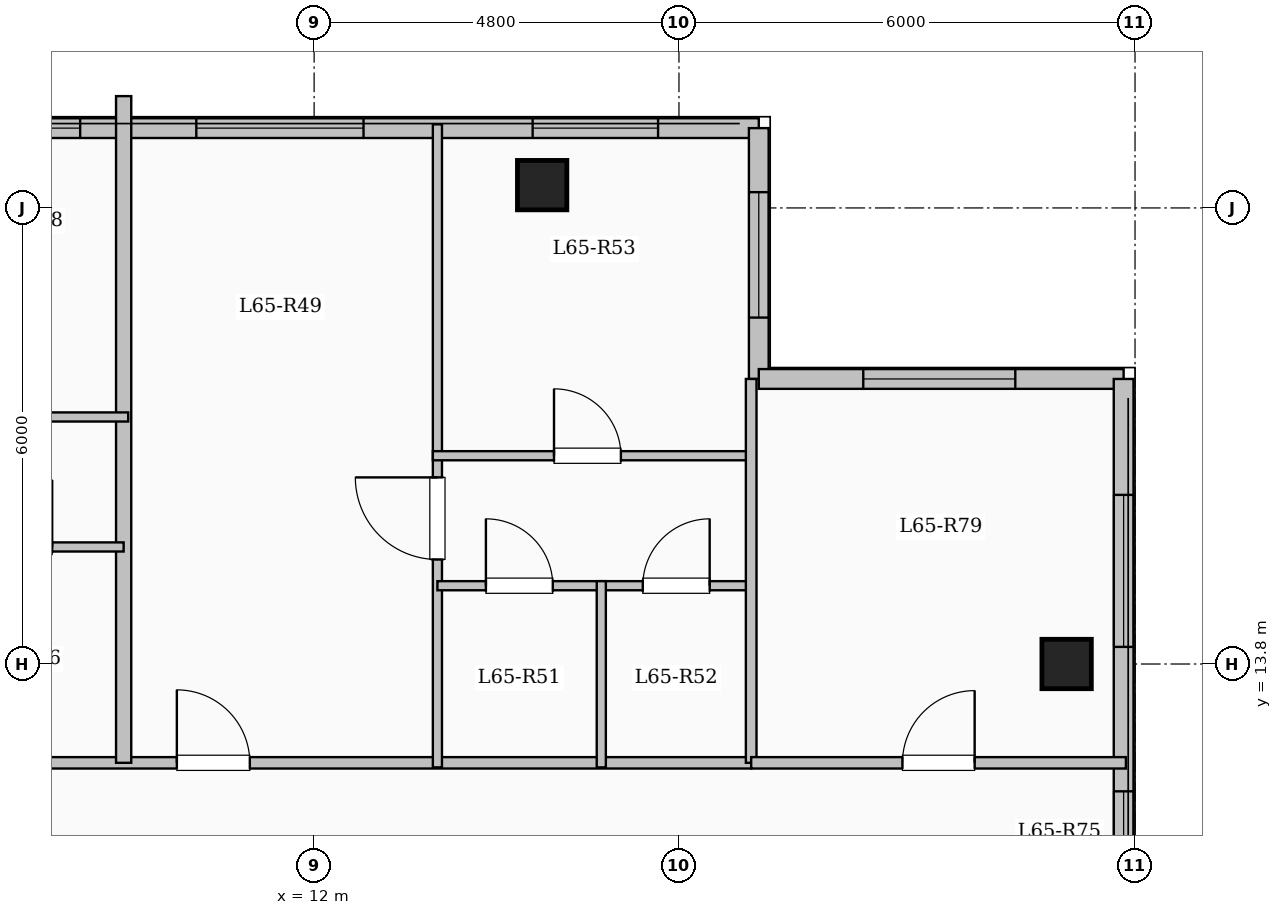
"""IFC4 building model, lengths in metres.
Left out: names, types, materials, properties, quantities, classifications, styles, units other than length and angle.
Written with IfcOpenShell. Run it as: python <this file> out.ifc"""

import sys

from ifc_helpers import new_model, si_unit, direction, frame, frame_2d, origin, origin_2d, place, context, subcontext, project, spatial, rectangle, extrude, element, fill, save


model = new_model("IFC4")
c1 = context("Model", 3, precision=1e-05, world=origin(), true_north=direction((0.0, 1.0)))
c2 = subcontext(c1, "Body", "Model", "MODEL_VIEW")
j1 = project(units=[si_unit("LENGTHUNIT", "METRE"), si_unit("PLANEANGLEUNIT", "RADIAN")], contexts=[c1])
p1 = place(None, origin())
s1 = spatial("IfcSite", under=j1, at=p1, CompositionType="ELEMENT")
p2 = place(p1, origin())
s2 = spatial("IfcBuilding", under=s1, at=p2, CompositionType="ELEMENT")
p3 = place(p2, frame((0.0, 0.0, 241.5)))
s3 = spatial("IfcBuildingStorey", under=s2, at=p3, CompositionType="ELEMENT", Elevation=241.5)
for number, where, z_axis, x_axis in (
    (1, (15.0, 20.1, 0.0), (0.0, 0.0, 1.0), (1.0, 0.0, 0.0)),
    (2, (21.9, 13.8, 0.0), (0.0, 0.0, 1.0), (1.0, 0.0, 0.0)),
):
    element("IfcColumn", number, at=place(p3, frame(where, z_axis=z_axis, x_axis=x_axis)), inside=s3, PredefinedType="COLUMN", context=c2, shape_type="SweptSolid", body=[
        extrude(rectangle(XDim=0.65, YDim=0.65, at=origin_2d()), origin(), (0.0, 0.0, 1.0), 3.35),
    ])
p4 = place(p3, frame((7.35, 20.85, 0.0), z_axis=(0.0, 0.0, 1.0), x_axis=(1.0, 0.0, 0.0)))
e3 = element("IfcWall", 3, at=p4, inside=s3, PredefinedType="SOLIDWALL", context=c2, shape_type="SweptSolid", body=[
    extrude(rectangle(XDim=10.5, YDim=0.26, at=frame_2d((5.25, 0.0))), origin(), (0.0, 0.0, 1.0), 3.1),
])
p5 = place(p4, frame((0.372, 0.0, 0.95)))
e4 = element("IfcOpeningElement", 4, at=p5, cuts=e3, PredefinedType="OPENING", context=c2, shape_type="SweptSolid", body=[
    extrude(rectangle(XDim=1.2, YDim=1.5, at=frame_2d((0.6, 0.75))), frame((0.0, 0.14, 0.0), z_axis=(0.0, -1.0, 0.0), x_axis=(1.0, 0.0, 0.0)), (0.0, 0.0, 1.0), 0.28),
])
p6 = place(p4, frame((3.1, 0.0, 0.9)))
e5 = element("IfcOpeningElement", 5, at=p6, cuts=e3, PredefinedType="OPENING", context=c2, shape_type="SweptSolid", body=[
    extrude(rectangle(XDim=2.2, YDim=1.75, at=frame_2d((1.1, 0.875))), frame((0.0, 0.14, 0.0), z_axis=(0.0, -1.0, 0.0), x_axis=(1.0, 0.0, 0.0)), (0.0, 0.0, 1.0), 0.28),
])
p7 = place(p4, frame((7.525, 0.0, 0.9)))
e6 = element("IfcOpeningElement", 6, at=p7, cuts=e3, PredefinedType="OPENING", context=c2, shape_type="SweptSolid", body=[
    extrude(rectangle(XDim=1.65, YDim=1.6, at=frame_2d((0.825, 0.8))), frame((0.0, 0.14, 0.0), z_axis=(0.0, -1.0, 0.0), x_axis=(1.0, 0.0, 0.0)), (0.0, 0.0, 1.0), 0.28),
])
p8 = place(p3, frame((17.85, 20.85, 0.0), z_axis=(0.0, 0.0, 1.0), x_axis=(0.0, -1.0, 0.0)))
e7 = element("IfcWall", 7, at=p8, inside=s3, PredefinedType="SOLIDWALL", context=c2, shape_type="SweptSolid", body=[
    extrude(rectangle(XDim=3.3, YDim=0.26, at=frame_2d((1.65, 0.0))), origin(), (0.0, 0.0, 1.0), 3.1),
])
p9 = place(p8, frame((0.843, 0.0, 0.9)))
e8 = element("IfcOpeningElement", 8, at=p9, cuts=e7, PredefinedType="OPENING", context=c2, shape_type="SweptSolid", body=[
    extrude(rectangle(XDim=1.65, YDim=1.6, at=frame_2d((0.825, 0.8))), frame((0.0, 0.14, 0.0), z_axis=(0.0, -1.0, 0.0), x_axis=(1.0, 0.0, 0.0)), (0.0, 0.0, 1.0), 0.28),
])
p10 = place(p3, frame((17.85, 17.55, 0.0), z_axis=(0.0, 0.0, 1.0), x_axis=(1.0, 0.0, 0.0)))
e9 = element("IfcWall", 9, at=p10, inside=s3, PredefinedType="SOLIDWALL", context=c2, shape_type="SweptSolid", body=[
    extrude(rectangle(XDim=4.8, YDim=0.26, at=frame_2d((2.4, 0.0))), origin(), (0.0, 0.0, 1.0), 3.1),
])
p11 = place(p10, frame((1.375, 0.0, 0.9)))
e10 = element("IfcOpeningElement", 10, at=p11, cuts=e9, PredefinedType="OPENING", context=c2, shape_type="SweptSolid", body=[
    extrude(rectangle(XDim=2.0, YDim=1.7, at=frame_2d((1.0, 0.85))), frame((0.0, 0.14, 0.0), z_axis=(0.0, -1.0, 0.0), x_axis=(1.0, 0.0, 0.0)), (0.0, 0.0, 1.0), 0.28),
])
p12 = place(p3, frame((22.65, 17.55, 0.0), z_axis=(0.0, 0.0, 1.0), x_axis=(0.0, -1.0, 0.0)))
e11 = element("IfcWall", 11, at=p12, inside=s3, PredefinedType="SOLIDWALL", context=c2, shape_type="SweptSolid", body=[
    extrude(rectangle(XDim=35.1, YDim=0.26, at=frame_2d((17.55, 0.0))), origin(), (0.0, 0.0, 1.0), 3.1),
])
p13 = place(p12, frame((1.525, 0.0, 0.9)))
e12 = element("IfcOpeningElement", 12, at=p13, cuts=e11, PredefinedType="OPENING", context=c2, shape_type="SweptSolid", body=[
    extrude(rectangle(XDim=2.0, YDim=1.7, at=frame_2d((1.0, 0.85))), frame((0.0, 0.14, 0.0), z_axis=(0.0, -1.0, 0.0), x_axis=(1.0, 0.0, 0.0)), (0.0, 0.0, 1.0), 0.28),
])
p14 = place(p12, frame((5.425, 0.0, 0.95)))
e13 = element("IfcOpeningElement", 13, at=p14, cuts=e11, PredefinedType="OPENING", context=c2, shape_type="SweptSolid", body=[
    extrude(rectangle(XDim=1.0, YDim=1.5, at=frame_2d((0.5, 0.75))), frame((0.0, 0.14, 0.0), z_axis=(0.0, -1.0, 0.0), x_axis=(1.0, 0.0, 0.0)), (0.0, 0.0, 1.0), 0.28),
])
p15 = place(p12, frame((8.675, 0.0, 0.9)))
e14 = element("IfcOpeningElement", 14, at=p15, cuts=e11, PredefinedType="OPENING", context=c2, shape_type="SweptSolid", body=[
    extrude(rectangle(XDim=2.0, YDim=1.7, at=frame_2d((1.0, 0.85))), frame((0.0, 0.14, 0.0), z_axis=(0.0, -1.0, 0.0), x_axis=(1.0, 0.0, 0.0)), (0.0, 0.0, 1.0), 0.28),
])
p16 = place(p12, frame((13.5, 0.0, 0.9)))
e15 = element("IfcOpeningElement", 15, at=p16, cuts=e11, PredefinedType="OPENING", context=c2, shape_type="SweptSolid", body=[
    extrude(rectangle(XDim=1.65, YDim=1.6, at=frame_2d((0.825, 0.8))), frame((0.0, 0.14, 0.0), z_axis=(0.0, -1.0, 0.0), x_axis=(1.0, 0.0, 0.0)), (0.0, 0.0, 1.0), 0.28),
])
p17 = place(p12, frame((19.35, 0.0, 0.9)))
e16 = element("IfcOpeningElement", 16, at=p17, cuts=e11, PredefinedType="OPENING", context=c2, shape_type="SweptSolid", body=[
    extrude(rectangle(XDim=2.2, YDim=1.75, at=frame_2d((1.1, 0.875))), frame((0.0, 0.14, 0.0), z_axis=(0.0, -1.0, 0.0), x_axis=(1.0, 0.0, 0.0)), (0.0, 0.0, 1.0), 0.28),
])
p18 = place(p12, frame((25.275, 0.0, 0.95)))
e17 = element("IfcOpeningElement", 17, at=p18, cuts=e11, PredefinedType="OPENING", context=c2, shape_type="SweptSolid", body=[
    extrude(rectangle(XDim=1.2, YDim=1.5, at=frame_2d((0.6, 0.75))), frame((0.0, 0.14, 0.0), z_axis=(0.0, -1.0, 0.0), x_axis=(1.0, 0.0, 0.0)), (0.0, 0.0, 1.0), 0.28),
])
p19 = place(p12, frame((29.925, 0.0, 0.9)))
e18 = element("IfcOpeningElement", 18, at=p19, cuts=e11, PredefinedType="OPENING", context=c2, shape_type="SweptSolid", body=[
    extrude(rectangle(XDim=2.2, YDim=1.75, at=frame_2d((1.1, 0.875))), frame((0.0, 0.14, 0.0), z_axis=(0.0, -1.0, 0.0), x_axis=(1.0, 0.0, 0.0)), (0.0, 0.0, 1.0), 0.28),
])
p20 = place(p3, frame((3.85, 12.5, 0.0), z_axis=(0.0, 0.0, 1.0), x_axis=(1.0, 0.0, 0.0)))
e19 = element("IfcWall", 19, at=p20, inside=s3, PredefinedType="PARTITIONING", context=c2, shape_type="SweptSolid", body=[
    extrude(rectangle(XDim=13.9, YDim=0.15, at=frame_2d((6.95, 0.0))), origin(), (0.0, 0.0, 1.0), 3.1),
])
p21 = place(p20, frame((0.7, 0.0, 0.0)))
e20 = element("IfcOpeningElement", 20, at=p21, cuts=e19, PredefinedType="OPENING", context=c2, shape_type="SweptSolid", body=[
    extrude(rectangle(XDim=0.96, YDim=2.15, at=frame_2d((0.48, 1.075))), frame((0.0, 0.085, 0.0), z_axis=(0.0, -1.0, 0.0), x_axis=(1.0, 0.0, 0.0)), (0.0, 0.0, 1.0), 0.17),
])
p22 = place(p20, frame((6.344, 0.0, 0.0)))
e21 = element("IfcOpeningElement", 21, at=p22, cuts=e19, PredefinedType="OPENING", context=c2, shape_type="SweptSolid", body=[
    extrude(rectangle(XDim=0.96, YDim=2.15, at=frame_2d((0.48, 1.075))), frame((0.0, 0.085, 0.0), z_axis=(0.0, -1.0, 0.0), x_axis=(1.0, 0.0, 0.0)), (0.0, 0.0, 1.0), 0.17),
])
p23 = place(p3, frame((9.494, 12.5, 0.0), z_axis=(0.0, 0.0, 1.0), x_axis=(0.0, 1.0, 0.0)))
e22 = element("IfcWall", 22, at=p23, inside=s3, PredefinedType="SOLIDWALL", context=c2, shape_type="SweptSolid", body=[
    extrude(rectangle(XDim=8.771, YDim=0.2, at=frame_2d((4.385, 0.0))), origin(), (0.0, 0.0, 1.0), 3.1),
])
p24 = place(p3, frame((6.734, 15.34, 0.0), z_axis=(0.0, 0.0, 1.0), x_axis=(1.0, 0.0, 0.0)))
e23 = element("IfcWall", 23, at=p24, inside=s3, PredefinedType="PARTITIONING", context=c2, shape_type="SweptSolid", body=[
    extrude(rectangle(XDim=2.76, YDim=0.12, at=frame_2d((1.38, 0.0))), origin(), (0.0, 0.0, 1.0), 2.785),
])
p25 = place(p24, frame((0.94, 0.0, 0.0)))
e24 = element("IfcOpeningElement", 24, at=p25, cuts=e23, PredefinedType="OPENING", context=c2, shape_type="SweptSolid", body=[
    extrude(rectangle(XDim=0.88, YDim=2.1, at=frame_2d((0.44, 1.05))), frame((0.0, 0.07, 0.0), z_axis=(0.0, -1.0, 0.0), x_axis=(1.0, 0.0, 0.0)), (0.0, 0.0, 1.0), 0.14),
])
p26 = place(p3, frame((4.08, 17.05, 0.0), z_axis=(0.0, 0.0, 1.0), x_axis=(1.0, 0.0, 0.0)))
e25 = element("IfcWall", 25, at=p26, inside=s3, PredefinedType="PARTITIONING", context=c2, shape_type="SweptSolid", body=[
    extrude(rectangle(XDim=5.474, YDim=0.12, at=frame_2d((2.737, 0.0))), origin(), (0.0, 0.0, 1.0), 2.785),
])
p27 = place(p26, frame((0.883, 0.0, 0.0)))
e26 = element("IfcOpeningElement", 26, at=p27, cuts=e25, PredefinedType="OPENING", context=c2, shape_type="SweptSolid", body=[
    extrude(rectangle(XDim=0.88, YDim=2.1, at=frame_2d((0.44, 1.05))), frame((0.0, 0.07, 0.0), z_axis=(0.0, -1.0, 0.0), x_axis=(1.0, 0.0, 0.0)), (0.0, 0.0, 1.0), 0.14),
])
p28 = place(p26, frame((3.53, 0.0, 0.0)))
e27 = element("IfcOpeningElement", 27, at=p28, cuts=e25, PredefinedType="OPENING", context=c2, shape_type="SweptSolid", body=[
    extrude(rectangle(XDim=0.88, YDim=2.1, at=frame_2d((0.44, 1.05))), frame((0.0, 0.07, 0.0), z_axis=(0.0, -1.0, 0.0), x_axis=(1.0, 0.0, 0.0)), (0.0, 0.0, 1.0), 0.14),
])
p29 = place(p3, frame((13.622, 12.44, 0.0), z_axis=(0.0, 0.0, 1.0), x_axis=(0.0, 1.0, 0.0)))
e28 = element("IfcWall", 28, at=p29, inside=s3, PredefinedType="PARTITIONING", context=c2, shape_type="SweptSolid", body=[
    extrude(rectangle(XDim=8.46, YDim=0.12, at=frame_2d((4.23, 0.0))), origin(), (0.0, 0.0, 1.0), 3.1),
])
p30 = place(p29, frame((2.735, 0.0, 0.0)))
e29 = element("IfcOpeningElement", 29, at=p30, cuts=e28, PredefinedType="OPENING", context=c2, shape_type="SweptSolid", body=[
    extrude(rectangle(XDim=1.08, YDim=2.15, at=frame_2d((0.54, 1.075))), frame((0.0, 0.07, 0.0), z_axis=(0.0, -1.0, 0.0), x_axis=(1.0, 0.0, 0.0)), (0.0, 0.0, 1.0), 0.14),
])
p31 = place(p3, frame((13.622, 14.83, 0.0), z_axis=(0.0, 0.0, 1.0), x_axis=(1.0, 0.0, 0.0)))
e30 = element("IfcWall", 30, at=p31, inside=s3, PredefinedType="PARTITIONING", context=c2, shape_type="SweptSolid", body=[
    extrude(rectangle(XDim=2.156, YDim=0.12, at=frame_2d((1.078, 0.0))), origin(), (0.0, 0.0, 1.0), 3.1),
])
p32 = place(p31, frame((0.638, 0.0, 0.0)))
e31 = element("IfcOpeningElement", 31, at=p32, cuts=e30, PredefinedType="OPENING", context=c2, shape_type="SweptSolid", body=[
    extrude(rectangle(XDim=0.88, YDim=2.1, at=frame_2d((0.44, 1.05))), frame((0.0, 0.07, 0.0), z_axis=(0.0, -1.0, 0.0), x_axis=(1.0, 0.0, 0.0)), (0.0, 0.0, 1.0), 0.14),
])
p33 = place(p3, frame((15.778, 14.83, 0.0), z_axis=(0.0, 0.0, 1.0), x_axis=(1.0, 0.0, 0.0)))
e32 = element("IfcWall", 32, at=p33, inside=s3, PredefinedType="PARTITIONING", context=c2, shape_type="SweptSolid", body=[
    extrude(rectangle(XDim=1.972, YDim=0.12, at=frame_2d((0.986, 0.0))), origin(), (0.0, 0.0, 1.0), 3.1),
])
p34 = place(p33, frame((0.546, 0.0, 0.0)))
e33 = element("IfcOpeningElement", 33, at=p34, cuts=e32, PredefinedType="OPENING", context=c2, shape_type="SweptSolid", body=[
    extrude(rectangle(XDim=0.88, YDim=2.1, at=frame_2d((0.44, 1.05))), frame((0.0, 0.07, 0.0), z_axis=(0.0, -1.0, 0.0), x_axis=(1.0, 0.0, 0.0)), (0.0, 0.0, 1.0), 0.14),
])
p35 = place(p3, frame((13.562, 16.54, 0.0), z_axis=(0.0, 0.0, 1.0), x_axis=(1.0, 0.0, 0.0)))
e34 = element("IfcWall", 34, at=p35, inside=s3, PredefinedType="PARTITIONING", context=c2, shape_type="SweptSolid", body=[
    extrude(rectangle(XDim=4.248, YDim=0.12, at=frame_2d((2.124, 0.0))), origin(), (0.0, 0.0, 1.0), 3.1),
])
p36 = place(p35, frame((1.594, 0.0, 0.0)))
e35 = element("IfcOpeningElement", 35, at=p36, cuts=e34, PredefinedType="OPENING", context=c2, shape_type="SweptSolid", body=[
    extrude(rectangle(XDim=0.88, YDim=2.1, at=frame_2d((0.44, 1.05))), frame((0.0, 0.07, 0.0), z_axis=(0.0, -1.0, 0.0), x_axis=(1.0, 0.0, 0.0)), (0.0, 0.0, 1.0), 0.14),
])
p37 = place(p3, frame((15.778, 12.44, 0.0), z_axis=(0.0, 0.0, 1.0), x_axis=(0.0, 1.0, 0.0)))
e36 = element("IfcWall", 36, at=p37, inside=s3, PredefinedType="PARTITIONING", context=c2, shape_type="SweptSolid", body=[
    extrude(rectangle(XDim=2.45, YDim=0.12, at=frame_2d((1.225, 0.0))), origin(), (0.0, 0.0, 1.0), 3.1),
])
p38 = place(p3, frame((17.75, 12.5, 0.0), z_axis=(0.0, 0.0, 1.0), x_axis=(0.0, 1.0, 0.0)))
e37 = element("IfcWall", 37, at=p38, inside=s3, PredefinedType="PARTITIONING", context=c2, shape_type="SweptSolid", body=[
    extrude(rectangle(XDim=5.05, YDim=0.14, at=frame_2d((2.525, 0.0))), origin(), (0.0, 0.0, 1.0), 3.1),
])
p39 = place(p3, frame((17.75, 12.5, 0.0), z_axis=(0.0, 0.0, 1.0), x_axis=(1.0, 0.0, 0.0)))
e38 = element("IfcWall", 38, at=p39, inside=s3, PredefinedType="PARTITIONING", context=c2, shape_type="SweptSolid", body=[
    extrude(rectangle(XDim=4.93, YDim=0.15, at=frame_2d((2.465, 0.0))), origin(), (0.0, 0.0, 1.0), 3.1),
])
p40 = place(p39, frame((1.99, 0.0, 0.0)))
e39 = element("IfcOpeningElement", 39, at=p40, cuts=e38, PredefinedType="OPENING", context=c2, shape_type="SweptSolid", body=[
    extrude(rectangle(XDim=0.95, YDim=2.15, at=frame_2d((0.475, 1.075))), frame((0.0, 0.085, 0.0), z_axis=(0.0, -1.0, 0.0), x_axis=(1.0, 0.0, 0.0)), (0.0, 0.0, 1.0), 0.17),
])
p41 = place(p5, origin())
e40 = element("IfcWindow", 40, at=p41, inside=s3, PartitioningType="SINGLE_PANEL", PredefinedType="WINDOW", context=c2, shape_type="SweptSolid", body=[
    extrude(rectangle(XDim=1.2, YDim=1.5, at=frame_2d((0.6, 0.75))), frame((0.0, 0.03, 0.0), z_axis=(0.0, -1.0, 0.0), x_axis=(1.0, 0.0, 0.0)), (0.0, 0.0, 1.0), 0.06),
])
fill(e4, e40)
p42 = place(p6, origin())
e41 = element("IfcWindow", 41, at=p42, inside=s3, PartitioningType="SINGLE_PANEL", PredefinedType="WINDOW", context=c2, shape_type="SweptSolid", body=[
    extrude(rectangle(XDim=2.2, YDim=1.75, at=frame_2d((1.1, 0.875))), frame((0.0, 0.03, 0.0), z_axis=(0.0, -1.0, 0.0), x_axis=(1.0, 0.0, 0.0)), (0.0, 0.0, 1.0), 0.06),
])
fill(e5, e41)
p43 = place(p7, origin())
e42 = element("IfcWindow", 42, at=p43, inside=s3, PartitioningType="SINGLE_PANEL", PredefinedType="WINDOW", context=c2, shape_type="SweptSolid", body=[
    extrude(rectangle(XDim=1.65, YDim=1.6, at=frame_2d((0.825, 0.8))), frame((0.0, 0.03, 0.0), z_axis=(0.0, -1.0, 0.0), x_axis=(1.0, 0.0, 0.0)), (0.0, 0.0, 1.0), 0.06),
])
fill(e6, e42)
p44 = place(p9, origin())
e43 = element("IfcWindow", 43, at=p44, inside=s3, PartitioningType="SINGLE_PANEL", PredefinedType="WINDOW", context=c2, shape_type="SweptSolid", body=[
    extrude(rectangle(XDim=1.65, YDim=1.6, at=frame_2d((0.825, 0.8))), frame((0.0, 0.03, 0.0), z_axis=(0.0, -1.0, 0.0), x_axis=(1.0, 0.0, 0.0)), (0.0, 0.0, 1.0), 0.06),
])
fill(e8, e43)
p45 = place(p11, origin())
e44 = element("IfcWindow", 44, at=p45, inside=s3, PartitioningType="SINGLE_PANEL", PredefinedType="WINDOW", context=c2, shape_type="SweptSolid", body=[
    extrude(rectangle(XDim=2.0, YDim=1.7, at=frame_2d((1.0, 0.85))), frame((0.0, 0.03, 0.0), z_axis=(0.0, -1.0, 0.0), x_axis=(1.0, 0.0, 0.0)), (0.0, 0.0, 1.0), 0.06),
])
fill(e10, e44)
p46 = place(p13, origin())
e45 = element("IfcWindow", 45, at=p46, inside=s3, PartitioningType="SINGLE_PANEL", PredefinedType="WINDOW", context=c2, shape_type="SweptSolid", body=[
    extrude(rectangle(XDim=2.0, YDim=1.7, at=frame_2d((1.0, 0.85))), frame((0.0, 0.03, 0.0), z_axis=(0.0, -1.0, 0.0), x_axis=(1.0, 0.0, 0.0)), (0.0, 0.0, 1.0), 0.06),
])
fill(e12, e45)
p47 = place(p14, origin())
e46 = element("IfcWindow", 46, at=p47, inside=s3, PartitioningType="SINGLE_PANEL", PredefinedType="WINDOW", context=c2, shape_type="SweptSolid", body=[
    extrude(rectangle(XDim=1.0, YDim=1.5, at=frame_2d((0.5, 0.75))), frame((0.0, 0.03, 0.0), z_axis=(0.0, -1.0, 0.0), x_axis=(1.0, 0.0, 0.0)), (0.0, 0.0, 1.0), 0.06),
])
fill(e13, e46)
p48 = place(p22, origin())
e47 = element("IfcDoor", 47, at=p48, inside=s3, OperationType="SINGLE_SWING_LEFT", PredefinedType="DOOR", context=c2, shape_type="SweptSolid", body=[
    extrude(rectangle(XDim=0.96, YDim=2.15, at=frame_2d((0.48, 1.075))), frame((0.0, 0.025, 0.0), z_axis=(0.0, -1.0, 0.0), x_axis=(1.0, 0.0, 0.0)), (0.0, 0.0, 1.0), 0.05),
])
fill(e21, e47)
p49 = place(p30, origin())
e48 = element("IfcDoor", 48, at=p49, inside=s3, OperationType="SINGLE_SWING_RIGHT", PredefinedType="DOOR", context=c2, shape_type="SweptSolid", body=[
    extrude(rectangle(XDim=1.08, YDim=2.15, at=frame_2d((0.54, 1.075))), frame((0.0, 0.025, 0.0), z_axis=(0.0, -1.0, 0.0), x_axis=(1.0, 0.0, 0.0)), (0.0, 0.0, 1.0), 0.05),
])
fill(e29, e48)
p50 = place(p32, origin())
e49 = element("IfcDoor", 49, at=p50, inside=s3, OperationType="SINGLE_SWING_LEFT", PredefinedType="DOOR", context=c2, shape_type="SweptSolid", body=[
    extrude(rectangle(XDim=0.88, YDim=2.1, at=frame_2d((0.44, 1.05))), frame((0.0, 0.025, 0.0), z_axis=(0.0, -1.0, 0.0), x_axis=(1.0, 0.0, 0.0)), (0.0, 0.0, 1.0), 0.05),
])
fill(e31, e49)
p51 = place(p34, origin())
e50 = element("IfcDoor", 50, at=p51, inside=s3, OperationType="SINGLE_SWING_RIGHT", PredefinedType="DOOR", context=c2, shape_type="SweptSolid", body=[
    extrude(rectangle(XDim=0.88, YDim=2.1, at=frame_2d((0.44, 1.05))), frame((0.0, 0.025, 0.0), z_axis=(0.0, -1.0, 0.0), x_axis=(1.0, 0.0, 0.0)), (0.0, 0.0, 1.0), 0.05),
])
fill(e33, e50)
p52 = place(p36, origin())
e51 = element("IfcDoor", 51, at=p52, inside=s3, OperationType="SINGLE_SWING_LEFT", PredefinedType="DOOR", context=c2, shape_type="SweptSolid", body=[
    extrude(rectangle(XDim=0.88, YDim=2.1, at=frame_2d((0.44, 1.05))), frame((0.0, 0.025, 0.0), z_axis=(0.0, -1.0, 0.0), x_axis=(1.0, 0.0, 0.0)), (0.0, 0.0, 1.0), 0.05),
])
fill(e35, e51)
p53 = place(p40, origin())
e52 = element("IfcDoor", 52, at=p53, inside=s3, OperationType="SINGLE_SWING_RIGHT", PredefinedType="DOOR", context=c2, shape_type="SweptSolid", body=[
    extrude(rectangle(XDim=0.95, YDim=2.15, at=frame_2d((0.475, 1.075))), frame((0.0, 0.025, 0.0), z_axis=(0.0, -1.0, 0.0), x_axis=(1.0, 0.0, 0.0)), (0.0, 0.0, 1.0), 0.05),
])
fill(e39, e52)
save(model, sys.argv[1])
